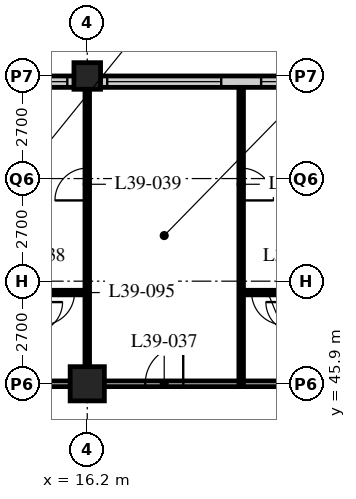
"""IFC4 building model, lengths in metres.
Left out: names, types, materials, properties, quantities, classifications, styles, units other than length and angle.
Written with IfcOpenShell. Run it as: python <this file> out.ifc"""

import sys

from ifc_helpers import new_model, si_unit, direction, frame, frame_2d, origin, origin_2d, place, context, subcontext, project, spatial, rectangle, hollow_rectangle, extrude, element, fill, save


model = new_model("IFC4")
c1 = context("Model", 3, precision=1e-05, world=origin(), true_north=direction((0.0, 1.0)))
c2 = subcontext(c1, "Body", "Model", "MODEL_VIEW")
j1 = project(units=[si_unit("LENGTHUNIT", "METRE"), si_unit("PLANEANGLEUNIT", "RADIAN")], contexts=[c1])
p1 = place(None, origin())
s1 = spatial("IfcSite", under=j1, at=p1, CompositionType="ELEMENT")
p2 = place(p1, origin())
s2 = spatial("IfcBuilding", under=s1, at=p2, CompositionType="ELEMENT")
p3 = place(p2, frame((0.0, 0.0, 151.0)))
s3 = spatial("IfcBuildingStorey", under=s2, at=p3, CompositionType="ELEMENT", Elevation=151.0)
p4 = place(p3, frame((16.2, 45.9, 0.0), z_axis=(0.0, 0.0, 1.0), x_axis=(1.0, 0.0, 0.0)))
e1 = element("IfcColumn", 1, at=p4, inside=s3, PredefinedType="COLUMN", context=c2, shape_type="SweptSolid", body=[
    extrude(hollow_rectangle(XDim=0.9, YDim=0.9, WallThickness=0.1, at=origin_2d()), origin(), (0.0, 0.0, 1.0), 3.4),
])
p5 = place(p3, frame((16.2, 54.0, 0.0), z_axis=(0.0, 0.0, 1.0), x_axis=(1.0, 0.0, 0.0)))
e2 = element("IfcColumn", 2, at=p5, inside=s3, PredefinedType="COLUMN", context=c2, shape_type="SweptSolid", body=[
    extrude(hollow_rectangle(XDim=0.7, YDim=0.7, WallThickness=0.07, at=origin_2d()), origin(), (0.0, 0.0, 1.0), 3.4),
])
p6 = place(p3, frame((48.3, 53.85, 0.0), z_axis=(0.0, 0.0, 1.0), x_axis=(-1.0, 0.0, 0.0)))
e3 = element("IfcWall", 3, at=p6, inside=s3, PredefinedType="SOLIDWALL", context=c2, shape_type="SweptSolid", body=[
    extrude(rectangle(XDim=40.2, YDim=0.3, at=frame_2d((20.1, 0.0))), origin(), (0.0, 0.0, 1.0), 3.19),
])
p7 = place(p6, frame((0.225, 0.0, 0.9)))
e4 = element("IfcOpeningElement", 4, at=p7, cuts=e3, PredefinedType="OPENING", context=c2, shape_type="SweptSolid", body=[
    extrude(rectangle(XDim=3.0, YDim=1.4, at=frame_2d((1.5, 0.7))), frame((0.0, 0.16, 0.0), z_axis=(0.0, -1.0, 0.0), x_axis=(1.0, 0.0, 0.0)), (0.0, 0.0, 1.0), 0.32),
])
p8 = place(p6, frame((4.275, 0.0, 0.9)))
e5 = element("IfcOpeningElement", 5, at=p8, cuts=e3, PredefinedType="OPENING", context=c2, shape_type="SweptSolid", body=[
    extrude(rectangle(XDim=3.0, YDim=1.4, at=frame_2d((1.5, 0.7))), frame((0.0, 0.16, 0.0), z_axis=(0.0, -1.0, 0.0), x_axis=(1.0, 0.0, 0.0)), (0.0, 0.0, 1.0), 0.32),
])
p9 = place(p6, frame((8.325, 0.0, 0.9)))
e6 = element("IfcOpeningElement", 6, at=p9, cuts=e3, PredefinedType="OPENING", context=c2, shape_type="SweptSolid", body=[
    extrude(rectangle(XDim=3.0, YDim=1.4, at=frame_2d((1.5, 0.7))), frame((0.0, 0.16, 0.0), z_axis=(0.0, -1.0, 0.0), x_axis=(1.0, 0.0, 0.0)), (0.0, 0.0, 1.0), 0.32),
])
p10 = place(p6, frame((12.375, 0.0, 0.9)))
e7 = element("IfcOpeningElement", 7, at=p10, cuts=e3, PredefinedType="OPENING", context=c2, shape_type="SweptSolid", body=[
    extrude(rectangle(XDim=3.0, YDim=1.4, at=frame_2d((1.5, 0.7))), frame((0.0, 0.16, 0.0), z_axis=(0.0, -1.0, 0.0), x_axis=(1.0, 0.0, 0.0)), (0.0, 0.0, 1.0), 0.32),
])
p11 = place(p6, frame((16.425, 0.0, 0.9)))
e8 = element("IfcOpeningElement", 8, at=p11, cuts=e3, PredefinedType="OPENING", context=c2, shape_type="SweptSolid", body=[
    extrude(rectangle(XDim=3.0, YDim=1.4, at=frame_2d((1.5, 0.7))), frame((0.0, 0.16, 0.0), z_axis=(0.0, -1.0, 0.0), x_axis=(1.0, 0.0, 0.0)), (0.0, 0.0, 1.0), 0.32),
])
p12 = place(p6, frame((20.475, 0.0, 0.9)))
e9 = element("IfcOpeningElement", 9, at=p12, cuts=e3, PredefinedType="OPENING", context=c2, shape_type="SweptSolid", body=[
    extrude(rectangle(XDim=3.0, YDim=1.4, at=frame_2d((1.5, 0.7))), frame((0.0, 0.16, 0.0), z_axis=(0.0, -1.0, 0.0), x_axis=(1.0, 0.0, 0.0)), (0.0, 0.0, 1.0), 0.32),
])
p13 = place(p6, frame((24.525, 0.0, 0.9)))
e10 = element("IfcOpeningElement", 10, at=p13, cuts=e3, PredefinedType="OPENING", context=c2, shape_type="SweptSolid", body=[
    extrude(rectangle(XDim=3.0, YDim=1.4, at=frame_2d((1.5, 0.7))), frame((0.0, 0.16, 0.0), z_axis=(0.0, -1.0, 0.0), x_axis=(1.0, 0.0, 0.0)), (0.0, 0.0, 1.0), 0.32),
])
p14 = place(p6, frame((28.575, 0.0, 0.9)))
e11 = element("IfcOpeningElement", 11, at=p14, cuts=e3, PredefinedType="OPENING", context=c2, shape_type="SweptSolid", body=[
    extrude(rectangle(XDim=3.0, YDim=1.4, at=frame_2d((1.5, 0.7))), frame((0.0, 0.16, 0.0), z_axis=(0.0, -1.0, 0.0), x_axis=(1.0, 0.0, 0.0)), (0.0, 0.0, 1.0), 0.32),
])
p15 = place(p6, frame((32.625, 0.0, 0.9)))
e12 = element("IfcOpeningElement", 12, at=p15, cuts=e3, PredefinedType="OPENING", context=c2, shape_type="SweptSolid", body=[
    extrude(rectangle(XDim=3.0, YDim=1.4, at=frame_2d((1.5, 0.7))), frame((0.0, 0.16, 0.0), z_axis=(0.0, -1.0, 0.0), x_axis=(1.0, 0.0, 0.0)), (0.0, 0.0, 1.0), 0.32),
])
p16 = place(p6, frame((36.675, 0.0, 0.9)))
e13 = element("IfcOpeningElement", 13, at=p16, cuts=e3, PredefinedType="OPENING", context=c2, shape_type="SweptSolid", body=[
    extrude(rectangle(XDim=3.0, YDim=1.4, at=frame_2d((1.5, 0.7))), frame((0.0, 0.16, 0.0), z_axis=(0.0, -1.0, 0.0), x_axis=(1.0, 0.0, 0.0)), (0.0, 0.0, 1.0), 0.32),
])
p17 = place(p3, frame((8.1, 45.9, 0.0), z_axis=(0.0, 0.0, 1.0), x_axis=(1.0, 0.0, 0.0)))
e14 = element("IfcWall", 14, at=p17, inside=s3, PredefinedType="PARTITIONING", context=c2, shape_type="SweptSolid", body=[
    extrude(rectangle(XDim=40.5, YDim=0.15, at=frame_2d((20.25, 0.0))), origin(), (0.0, 0.0, 1.0), 2.42),
])
p18 = place(p17, frame((9.625, 0.0, 0.0)))
e15 = element("IfcOpeningElement", 15, at=p18, cuts=e14, PredefinedType="OPENING", context=c2, shape_type="SweptSolid", body=[
    extrude(rectangle(XDim=1.0, YDim=2.1, at=frame_2d((0.5, 1.05))), frame((0.0, 0.085, 0.0), z_axis=(0.0, -1.0, 0.0), x_axis=(1.0, 0.0, 0.0)), (0.0, 0.0, 1.0), 0.17),
])
p19 = place(p17, frame((21.775, 0.0, 0.0)))
e16 = element("IfcOpeningElement", 16, at=p19, cuts=e14, PredefinedType="OPENING", context=c2, shape_type="SweptSolid", body=[
    extrude(rectangle(XDim=1.0, YDim=2.1, at=frame_2d((0.5, 1.05))), frame((0.0, 0.085, 0.0), z_axis=(0.0, -1.0, 0.0), x_axis=(1.0, 0.0, 0.0)), (0.0, 0.0, 1.0), 0.17),
])
p20 = place(p17, frame((28.95, 0.0, 0.0)))
e17 = element("IfcOpeningElement", 17, at=p20, cuts=e14, PredefinedType="OPENING", context=c2, shape_type="SweptSolid", body=[
    extrude(rectangle(XDim=1.0, YDim=2.1, at=frame_2d((0.5, 1.05))), frame((0.0, 0.085, 0.0), z_axis=(0.0, -1.0, 0.0), x_axis=(1.0, 0.0, 0.0)), (0.0, 0.0, 1.0), 0.17),
])
p21 = place(p17, frame((34.85, 0.0, 0.0)))
e18 = element("IfcOpeningElement", 18, at=p21, cuts=e14, PredefinedType="OPENING", context=c2, shape_type="SweptSolid", body=[
    extrude(rectangle(XDim=1.0, YDim=2.1, at=frame_2d((0.5, 1.05))), frame((0.0, 0.085, 0.0), z_axis=(0.0, -1.0, 0.0), x_axis=(1.0, 0.0, 0.0)), (0.0, 0.0, 1.0), 0.17),
])
p22 = place(p17, frame((36.875, 0.0, 0.0)))
e19 = element("IfcOpeningElement", 19, at=p22, cuts=e14, PredefinedType="OPENING", context=c2, shape_type="SweptSolid", body=[
    extrude(rectangle(XDim=1.0, YDim=2.1, at=frame_2d((0.5, 1.05))), frame((0.0, 0.085, 0.0), z_axis=(0.0, -1.0, 0.0), x_axis=(1.0, 0.0, 0.0)), (0.0, 0.0, 1.0), 0.17),
])
p23 = place(p17, frame((2.625, 0.0, 0.0)))
e20 = element("IfcOpeningElement", 20, at=p23, cuts=e14, PredefinedType="OPENING", context=c2, shape_type="SweptSolid", body=[
    extrude(rectangle(XDim=1.0, YDim=2.1, at=frame_2d((0.5, 1.05))), frame((0.0, 0.085, 0.0), z_axis=(0.0, -1.0, 0.0), x_axis=(1.0, 0.0, 0.0)), (0.0, 0.0, 1.0), 0.17),
])
p24 = place(p3, frame((16.2, 45.9, 0.0), z_axis=(0.0, 0.0, 1.0), x_axis=(0.0, 1.0, 0.0)))
e21 = element("IfcWall", 21, at=p24, inside=s3, PredefinedType="PARTITIONING", context=c2, shape_type="SweptSolid", body=[
    extrude(rectangle(XDim=7.8, YDim=0.12, at=frame_2d((3.9, 0.0))), origin(), (0.0, 0.0, 1.0), 2.42),
])
p25 = place(p24, frame((4.825, 0.0, 0.0)))
e22 = element("IfcOpeningElement", 22, at=p25, cuts=e21, PredefinedType="OPENING", context=c2, shape_type="SweptSolid", body=[
    extrude(rectangle(XDim=0.85, YDim=2.1, at=frame_2d((0.425, 1.05))), frame((0.0, 0.07, 0.0), z_axis=(0.0, -1.0, 0.0), x_axis=(1.0, 0.0, 0.0)), (0.0, 0.0, 1.0), 0.14),
])
p26 = place(p3, frame((20.25, 45.9, 0.0), z_axis=(0.0, 0.0, 1.0), x_axis=(0.0, 1.0, 0.0)))
e23 = element("IfcWall", 23, at=p26, inside=s3, PredefinedType="PARTITIONING", context=c2, shape_type="SweptSolid", body=[
    extrude(rectangle(XDim=7.8, YDim=0.12, at=frame_2d((3.9, 0.0))), origin(), (0.0, 0.0, 1.0), 3.19),
])
p27 = place(p26, frame((4.825, 0.0, 0.0)))
e24 = element("IfcOpeningElement", 24, at=p27, cuts=e23, PredefinedType="OPENING", context=c2, shape_type="SweptSolid", body=[
    extrude(rectangle(XDim=0.85, YDim=2.1, at=frame_2d((0.425, 1.05))), frame((0.0, 0.07, 0.0), z_axis=(0.0, -1.0, 0.0), x_axis=(1.0, 0.0, 0.0)), (0.0, 0.0, 1.0), 0.14),
])
p28 = place(p3, frame((14.74, 48.3, 0.0), z_axis=(0.0, 0.0, 1.0), x_axis=(1.0, 0.0, 0.0)))
e25 = element("IfcWall", 25, at=p28, inside=s3, PredefinedType="PARTITIONING", context=c2, shape_type="SweptSolid", body=[
    extrude(rectangle(XDim=1.46, YDim=0.12, at=frame_2d((0.73, 0.0))), origin(), (0.0, 0.0, 1.0), 3.19),
])
p29 = place(p28, frame((0.275, 0.0, 0.0)))
e26 = element("IfcOpeningElement", 26, at=p29, cuts=e25, PredefinedType="OPENING", context=c2, shape_type="SweptSolid", body=[
    extrude(rectangle(XDim=0.85, YDim=2.1, at=frame_2d((0.425, 1.05))), frame((0.0, 0.07, 0.0), z_axis=(0.0, -1.0, 0.0), x_axis=(1.0, 0.0, 0.0)), (0.0, 0.0, 1.0), 0.14),
])
p30 = place(p3, frame((20.25, 48.3, 0.0), z_axis=(0.0, 0.0, 1.0), x_axis=(1.0, 0.0, 0.0)))
e27 = element("IfcWall", 27, at=p30, inside=s3, PredefinedType="PARTITIONING", context=c2, shape_type="SweptSolid", body=[
    extrude(rectangle(XDim=1.46, YDim=0.12, at=frame_2d((0.73, 0.0))), origin(), (0.0, 0.0, 1.0), 3.19),
])
p31 = place(p30, frame((0.275, 0.0, 0.0)))
e28 = element("IfcOpeningElement", 28, at=p31, cuts=e27, PredefinedType="OPENING", context=c2, shape_type="SweptSolid", body=[
    extrude(rectangle(XDim=0.85, YDim=2.1, at=frame_2d((0.425, 1.05))), frame((0.0, 0.07, 0.0), z_axis=(0.0, -1.0, 0.0), x_axis=(1.0, 0.0, 0.0)), (0.0, 0.0, 1.0), 0.14),
])
p32 = place(p13, origin())
e29 = element("IfcWindow", 29, at=p32, inside=s3, PartitioningType="SINGLE_PANEL", PredefinedType="WINDOW", context=c2, shape_type="SweptSolid", body=[
    extrude(rectangle(XDim=3.0, YDim=1.4, at=frame_2d((1.5, 0.7))), frame((0.0, 0.03, 0.0), z_axis=(0.0, -1.0, 0.0), x_axis=(1.0, 0.0, 0.0)), (0.0, 0.0, 1.0), 0.06),
])
fill(e10, e29)
p33 = place(p14, origin())
e30 = element("IfcWindow", 30, at=p33, inside=s3, PartitioningType="SINGLE_PANEL", PredefinedType="WINDOW", context=c2, shape_type="SweptSolid", body=[
    extrude(rectangle(XDim=3.0, YDim=1.4, at=frame_2d((1.5, 0.7))), frame((0.0, 0.03, 0.0), z_axis=(0.0, -1.0, 0.0), x_axis=(1.0, 0.0, 0.0)), (0.0, 0.0, 1.0), 0.06),
])
fill(e11, e30)
p34 = place(p15, origin())
e31 = element("IfcWindow", 31, at=p34, inside=s3, PartitioningType="SINGLE_PANEL", PredefinedType="WINDOW", context=c2, shape_type="SweptSolid", body=[
    extrude(rectangle(XDim=3.0, YDim=1.4, at=frame_2d((1.5, 0.7))), frame((0.0, 0.03, 0.0), z_axis=(0.0, -1.0, 0.0), x_axis=(1.0, 0.0, 0.0)), (0.0, 0.0, 1.0), 0.06),
])
fill(e12, e31)
p35 = place(p18, origin())
e32 = element("IfcDoor", 32, at=p35, inside=s3, OperationType="SINGLE_SWING_RIGHT", PredefinedType="DOOR", context=c2, shape_type="SweptSolid", body=[
    extrude(rectangle(XDim=1.0, YDim=2.1, at=frame_2d((0.5, 1.05))), frame((0.0, 0.025, 0.0), z_axis=(0.0, -1.0, 0.0), x_axis=(1.0, 0.0, 0.0)), (0.0, 0.0, 1.0), 0.05),
])
fill(e15, e32)
p36 = place(p25, origin())
e33 = element("IfcDoor", 33, at=p36, inside=s3, OperationType="SINGLE_SWING_LEFT", PredefinedType="DOOR", context=c2, shape_type="SweptSolid", body=[
    extrude(rectangle(XDim=0.85, YDim=2.1, at=frame_2d((0.425, 1.05))), frame((0.0, 0.025, 0.0), z_axis=(0.0, -1.0, 0.0), x_axis=(1.0, 0.0, 0.0)), (0.0, 0.0, 1.0), 0.05),
])
fill(e22, e33)
p37 = place(p27, origin())
e34 = element("IfcDoor", 34, at=p37, inside=s3, OperationType="SINGLE_SWING_RIGHT", PredefinedType="DOOR", context=c2, shape_type="SweptSolid", body=[
    extrude(rectangle(XDim=0.85, YDim=2.1, at=frame_2d((0.425, 1.05))), frame((0.0, 0.025, 0.0), z_axis=(0.0, -1.0, 0.0), x_axis=(1.0, 0.0, 0.0)), (0.0, 0.0, 1.0), 0.05),
])
fill(e24, e34)
p38 = place(p29, origin())
e35 = element("IfcDoor", 35, at=p38, inside=s3, OperationType="SINGLE_SWING_RIGHT", PredefinedType="DOOR", context=c2, shape_type="SweptSolid", body=[
    extrude(rectangle(XDim=0.85, YDim=2.1, at=frame_2d((0.425, 1.05))), frame((0.0, 0.025, 0.0), z_axis=(0.0, -1.0, 0.0), x_axis=(1.0, 0.0, 0.0)), (0.0, 0.0, 1.0), 0.05),
])
fill(e26, e35)
p39 = place(p31, origin())
e36 = element("IfcDoor", 36, at=p39, inside=s3, OperationType="SINGLE_SWING_LEFT", PredefinedType="DOOR", context=c2, shape_type="SweptSolid", body=[
    extrude(rectangle(XDim=0.85, YDim=2.1, at=frame_2d((0.425, 1.05))), frame((0.0, 0.025, 0.0), z_axis=(0.0, -1.0, 0.0), x_axis=(1.0, 0.0, 0.0)), (0.0, 0.0, 1.0), 0.05),
])
fill(e28, e36)
save(model, sys.argv[1])
